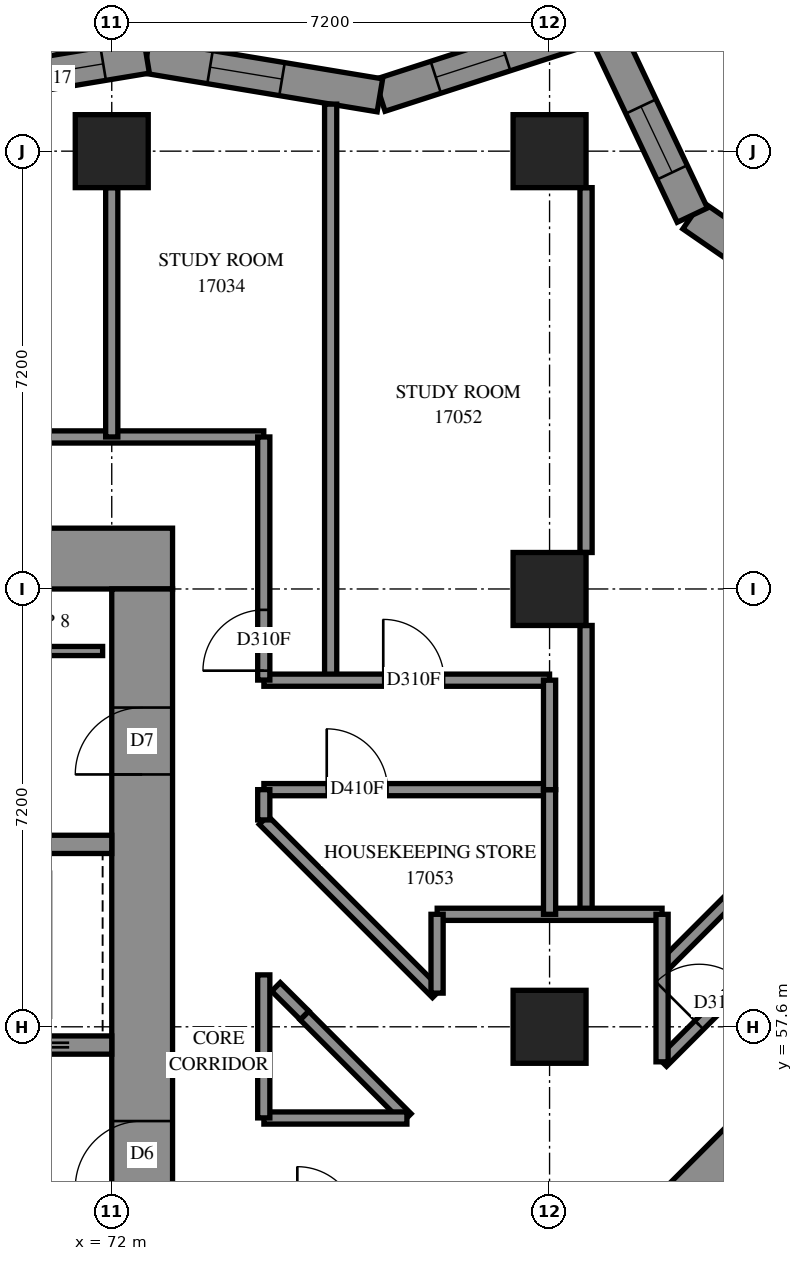
"""IFC4 building model, lengths in metres.
Left out: names, types, materials, properties, quantities, classifications, styles, units other than length and angle.
Written with IfcOpenShell. Run it as: python <this file> out.ifc"""

import sys

from ifc_helpers import new_model, si_unit, direction, frame, frame_2d, origin, origin_2d, place, context, subcontext, project, spatial, polyline, rectangle, outline, extrude, element, fill, save


model = new_model("IFC4")
c1 = context("Model", 3, precision=1e-05, world=origin(), true_north=direction((0.0, 1.0)))
c2 = subcontext(c1, "Body", "Model", "MODEL_VIEW")
j1 = project(units=[si_unit("LENGTHUNIT", "METRE"), si_unit("PLANEANGLEUNIT", "RADIAN")], contexts=[c1])
p1 = place(None, origin())
s1 = spatial("IfcSite", under=j1, at=p1, CompositionType="ELEMENT")
p2 = place(p1, origin())
s2 = spatial("IfcBuilding", under=s1, at=p2, CompositionType="ELEMENT")
p3 = place(p2, frame((0.0, 0.0, 64.4)))
s3 = spatial("IfcBuildingStorey", under=s2, at=p3, CompositionType="ELEMENT", Elevation=64.4)
for number, where, z_axis, x_axis in (
    (1, (72.0, 72.0, 0.0), (0.0, 0.0, 1.0), (1.0, 0.0, 0.0)),
    (2, (79.2, 57.6, 0.0), (0.0, 0.0, 1.0), (1.0, 0.0, 0.0)),
    (3, (79.2, 64.8, 0.0), (0.0, 0.0, 1.0), (1.0, 0.0, 0.0)),
    (4, (79.2, 72.0, 0.0), (0.0, 0.0, 1.0), (1.0, 0.0, 0.0)),
):
    element("IfcColumn", number, at=place(p3, frame(where, z_axis=z_axis, x_axis=x_axis)), inside=s3, PredefinedType="COLUMN", context=c2, shape_type="SweptSolid", body=[
        extrude(rectangle(XDim=1.2, YDim=1.2, at=origin_2d()), origin(), (0.0, 0.0, 1.0), 3.1),
    ])
p4 = place(p3, frame((56.6, 65.3, -0.3), z_axis=(0.0, 0.0, 1.0), x_axis=(1.0, 0.0, 0.0)))
e5 = element("IfcWall", 5, at=p4, inside=s3, PredefinedType="SHEAR", context=c2, shape_type="SweptSolid", body=[
    extrude(rectangle(XDim=16.4, YDim=1.0, at=frame_2d((8.2, 0.0))), origin(), (0.0, 0.0, 1.0), 2.7),
])
p5 = place(p4, frame((11.0, 0.0, 0.3)))
e6 = element("IfcOpeningElement", 6, at=p5, cuts=e5, PredefinedType="OPENING", context=c2, shape_type="SweptSolid", body=[
    extrude(rectangle(XDim=0.8, YDim=2.1, at=frame_2d((0.4, 1.05))), frame((0.0, 0.51, 0.0), z_axis=(0.0, -1.0, 0.0), x_axis=(1.0, 0.0, 0.0)), (0.0, 0.0, 1.0), 1.02),
])
p6 = place(p3, frame((72.5, 50.4, -0.3), z_axis=(0.0, 0.0, 1.0), x_axis=(0.0, 1.0, 0.0)))
e7 = element("IfcWall", 7, at=p6, inside=s3, PredefinedType="SHEAR", context=c2, shape_type="SweptSolid", body=[
    extrude(rectangle(XDim=14.4, YDim=1.0, at=frame_2d((7.2, 0.0))), origin(), (0.0, 0.0, 1.0), 2.7),
])
p7 = place(p6, frame((4.55, 0.0, 0.3)))
e8 = element("IfcOpeningElement", 8, at=p7, cuts=e7, PredefinedType="OPENING", context=c2, shape_type="SweptSolid", body=[
    extrude(rectangle(XDim=1.1, YDim=2.1, at=frame_2d((0.55, 1.05))), frame((0.0, 0.51, 0.0), z_axis=(0.0, -1.0, 0.0), x_axis=(1.0, 0.0, 0.0)), (0.0, 0.0, 1.0), 1.02),
])
p8 = place(p6, frame((11.35, 0.0, 0.3)))
e9 = element("IfcOpeningElement", 9, at=p8, cuts=e7, PredefinedType="OPENING", context=c2, shape_type="SweptSolid", body=[
    extrude(rectangle(XDim=1.1, YDim=2.1, at=frame_2d((0.55, 1.05))), frame((0.0, 0.51, 0.0), z_axis=(0.0, -1.0, 0.0), x_axis=(1.0, 0.0, 0.0)), (0.0, 0.0, 1.0), 1.02),
])
p9 = place(p3, frame((57.6, 57.3, 0.0), z_axis=(0.0, 0.0, 1.0), x_axis=(1.0, 0.0, 0.0)))
e10 = element("IfcWall", 10, at=p9, inside=s3, PredefinedType="SOLIDWALL", context=c2, shape_type="SweptSolid", body=[
    extrude(rectangle(XDim=14.4, YDim=0.3, at=frame_2d((7.2, 0.0))), origin(), (0.0, 0.0, 1.0), 3.1),
])
p10 = place(p9, frame((12.05, 0.0, 0.0)))
e11 = element("IfcOpeningElement", 11, at=p10, cuts=e10, PredefinedType="OPENING", context=c2, shape_type="SweptSolid", body=[
    extrude(rectangle(XDim=1.1, YDim=2.1, at=frame_2d((0.55, 1.05))), frame((0.0, 0.16, 0.0), z_axis=(0.0, -1.0, 0.0), x_axis=(1.0, 0.0, 0.0)), (0.0, 0.0, 1.0), 0.32),
])
p11 = place(p3, frame((64.8, 60.6, 0.0), z_axis=(0.0, 0.0, 1.0), x_axis=(1.0, 0.0, 0.0)))
e12 = element("IfcWall", 12, at=p11, inside=s3, PredefinedType="SOLIDWALL", context=c2, shape_type="SweptSolid", body=[
    extrude(rectangle(XDim=7.2, YDim=0.3, at=frame_2d((3.6, 0.0))), origin(), (0.0, 0.0, 1.0), 3.1),
])
p12 = place(p3, frame((76.301, 49.443, -0.3), z_axis=(0.0, 0.0, 1.0), x_axis=(0.7071067812, 0.7071067812, 0.0)))
e13 = element("IfcWall", 13, at=p12, inside=s3, PredefinedType="SHEAR", context=c2, shape_type="SweptSolid", body=[
    extrude(rectangle(XDim=14.4, YDim=1.0, at=frame_2d((7.2, 0.0))), origin(), (0.0, 0.0, 1.0), 2.7),
])
p13 = place(p12, frame((4.55, 0.0, 0.3)))
e14 = element("IfcOpeningElement", 14, at=p13, cuts=e13, PredefinedType="OPENING", context=c2, shape_type="SweptSolid", body=[
    extrude(rectangle(XDim=1.1, YDim=2.1, at=frame_2d((0.55, 1.05))), frame((0.0, 0.51, 0.0), z_axis=(0.0, -1.0, 0.0), x_axis=(1.0, 0.0, 0.0)), (0.0, 0.0, 1.0), 1.02),
])
p14 = place(p12, frame((11.35, 0.0, 0.3)))
e15 = element("IfcOpeningElement", 15, at=p14, cuts=e13, PredefinedType="OPENING", context=c2, shape_type="SweptSolid", body=[
    extrude(rectangle(XDim=1.1, YDim=2.1, at=frame_2d((0.55, 1.05))), frame((0.0, 0.51, 0.0), z_axis=(0.0, -1.0, 0.0), x_axis=(1.0, 0.0, 0.0)), (0.0, 0.0, 1.0), 1.02),
])
p15 = place(p3, frame((84.444, 68.949, 0.0), z_axis=(0.0, 0.0, 1.0), x_axis=(-0.8229699745, 0.5680848714, 0.0)))
e16 = element("IfcWall", 16, at=p15, inside=s3, PredefinedType="SOLIDWALL", context=c2, shape_type="SweptSolid", body=[
    extrude(outline(polyline([(-0.05, -0.275), (3.445, -0.275), (3.593, 0.275), (0.05, 0.275), (-0.05, -0.275)])), origin(), (0.0, 0.0, 1.0), 3.1),
])
p16 = place(p15, frame((0.677, 0.0, 0.5)))
e17 = element("IfcOpeningElement", 17, at=p16, cuts=e16, PredefinedType="OPENING", context=c2, shape_type="SweptSolid", body=[
    extrude(rectangle(XDim=1.2, YDim=2.45, at=frame_2d((0.6, 1.225))), frame((0.0, 0.285, 0.0), z_axis=(0.0, -1.0, 0.0), x_axis=(1.0, 0.0, 0.0)), (0.0, 0.0, 1.0), 0.57),
])
p17 = place(p3, frame((81.548, 70.948, 0.0), z_axis=(0.0, 0.0, 1.0), x_axis=(-0.427600137, 0.9039679877, 0.0)))
e18 = element("IfcWall", 18, at=p17, inside=s3, PredefinedType="SOLIDWALL", context=c2, shape_type="SweptSolid", body=[
    extrude(outline(polyline([(0.074, -0.275), (3.725, -0.275), (3.242, 0.275), (-0.074, 0.275), (0.074, -0.275)])), origin(), (0.0, 0.0, 1.0), 3.1),
])
p18 = place(p17, frame((0.777, 0.0, 0.5)))
e19 = element("IfcOpeningElement", 19, at=p18, cuts=e18, PredefinedType="OPENING", context=c2, shape_type="SweptSolid", body=[
    extrude(rectangle(XDim=1.2, YDim=2.45, at=frame_2d((0.6, 1.225))), frame((0.0, 0.285, 0.0), z_axis=(0.0, -1.0, 0.0), x_axis=(1.0, 0.0, 0.0)), (0.0, 0.0, 1.0), 0.57),
])
p19 = place(p3, frame((80.058, 74.097, 0.0), z_axis=(0.0, 0.0, 1.0), x_axis=(-0.951538377, -0.3075300264, 0.0)))
e20 = element("IfcWall", 20, at=p19, inside=s3, PredefinedType="SOLIDWALL", context=c2, shape_type="SweptSolid", body=[
    extrude(outline(polyline([(-0.242, -0.275), (3.768, -0.275), (3.901, 0.275), (0.242, 0.275), (-0.242, -0.275)])), origin(), (0.0, 0.0, 1.0), 3.1),
])
p20 = place(p19, frame((1.668, 0.0, 0.5)))
e21 = element("IfcOpeningElement", 21, at=p20, cuts=e20, PredefinedType="OPENING", context=c2, shape_type="SweptSolid", body=[
    extrude(rectangle(XDim=1.2, YDim=2.45, at=frame_2d((0.6, 1.225))), frame((0.0, 0.285, 0.0), z_axis=(0.0, -1.0, 0.0), x_axis=(1.0, 0.0, 0.0)), (0.0, 0.0, 1.0), 0.57),
])
p21 = place(p3, frame((76.41, 72.918, 0.0), z_axis=(0.0, 0.0, 1.0), x_axis=(-0.9865139149, 0.1636774136, 0.0)))
e22 = element("IfcWall", 22, at=p21, inside=s3, PredefinedType="SOLIDWALL", context=c2, shape_type="SweptSolid", body=[
    extrude(outline(polyline([(0.067, -0.275), (3.934, -0.275), (3.843, 0.275), (-0.067, 0.275), (0.067, -0.275)])), origin(), (0.0, 0.0, 1.0), 3.1),
])
p22 = place(p21, frame((1.632, 0.0, 0.5)))
e23 = element("IfcOpeningElement", 23, at=p22, cuts=e22, PredefinedType="OPENING", context=c2, shape_type="SweptSolid", body=[
    extrude(rectangle(XDim=1.2, YDim=2.45, at=frame_2d((0.6, 1.225))), frame((0.0, 0.285, 0.0), z_axis=(0.0, -1.0, 0.0), x_axis=(1.0, 0.0, 0.0)), (0.0, 0.0, 1.0), 0.57),
])
p23 = place(p3, frame((72.574, 73.554, 0.0), z_axis=(0.0, 0.0, 1.0), x_axis=(-0.9865110911, -0.1636944324, 0.0)))
e24 = element("IfcWall", 24, at=p23, inside=s3, PredefinedType="SOLIDWALL", context=c2, shape_type="SweptSolid", body=[
    extrude(outline(polyline([(-0.046, -0.275), (3.821, -0.275), (3.913, 0.275), (0.046, 0.275), (-0.046, -0.275)])), origin(), (0.0, 0.0, 1.0), 3.1),
])
p24 = place(p23, frame((0.724, 0.0, 0.5)))
e25 = element("IfcOpeningElement", 25, at=p24, cuts=e24, PredefinedType="OPENING", context=c2, shape_type="SweptSolid", body=[
    extrude(rectangle(XDim=2.8, YDim=2.45, at=frame_2d((1.4, 1.225))), frame((0.0, 0.285, 0.0), z_axis=(0.0, -1.0, 0.0), x_axis=(1.0, 0.0, 0.0)), (0.0, 0.0, 1.0), 0.57),
])
p25 = place(p3, frame((64.95, 63.78, 0.0), z_axis=(0.0, 0.0, 1.0), x_axis=(1.0, 0.0, 0.0)))
e26 = element("IfcWall", 26, at=p25, inside=s3, PredefinedType="PARTITIONING", context=c2, shape_type="SweptSolid", body=[
    extrude(rectangle(XDim=6.9, YDim=0.15, at=frame_2d((3.45, 0.0))), origin(), (0.0, 0.0, 1.0), 3.1),
])
p26 = place(p3, frame((55.1, 67.3, 0.0), z_axis=(0.0, 0.0, 1.0), x_axis=(1.0, 0.0, 0.0)))
e27 = element("IfcWall", 27, at=p26, inside=s3, PredefinedType="PARTITIONING", context=c2, shape_type="SweptSolid", body=[
    extrude(rectangle(XDim=19.4, YDim=0.2, at=frame_2d((9.7, 0.0))), origin(), (0.0, 0.0, 1.0), 3.1),
])
p27 = place(p26, frame((6.361, 0.0, 0.0)))
e28 = element("IfcOpeningElement", 28, at=p27, cuts=e27, PredefinedType="OPENING", context=c2, shape_type="SweptSolid", body=[
    extrude(rectangle(XDim=0.9, YDim=2.1, at=frame_2d((0.45, 1.05))), frame((0.0, 0.11, 0.0), z_axis=(0.0, -1.0, 0.0), x_axis=(1.0, 0.0, 0.0)), (0.0, 0.0, 1.0), 0.22),
])
p28 = place(p26, frame((13.561, 0.0, 0.0)))
e29 = element("IfcOpeningElement", 29, at=p28, cuts=e27, PredefinedType="OPENING", context=c2, shape_type="SweptSolid", body=[
    extrude(rectangle(XDim=0.9, YDim=2.1, at=frame_2d((0.45, 1.05))), frame((0.0, 0.11, 0.0), z_axis=(0.0, -1.0, 0.0), x_axis=(1.0, 0.0, 0.0)), (0.0, 0.0, 1.0), 0.22),
])
p29 = place(p3, frame((75.6, 63.3, 0.0), z_axis=(0.0, 0.0, 1.0), x_axis=(0.0, 1.0, 0.0)))
e30 = element("IfcWall", 30, at=p29, inside=s3, PredefinedType="PARTITIONING", context=c2, shape_type="SweptSolid", body=[
    extrude(rectangle(XDim=9.473, YDim=0.2, at=frame_2d((4.737, 0.0))), origin(), (0.0, 0.0, 1.0), 3.1),
])
p30 = place(p3, frame((81.049, 58.577, 0.0), z_axis=(0.0, 0.0, 1.0), x_axis=(0.7071067812, 0.7071067812, 0.0)))
e31 = element("IfcWall", 31, at=p30, inside=s3, PredefinedType="PARTITIONING", context=c2, shape_type="SweptSolid", body=[
    extrude(rectangle(XDim=9.099, YDim=0.2, at=frame_2d((4.55, 0.0))), origin(), (0.0, 0.0, 1.0), 3.1),
])
p31 = place(p3, frame((81.053, 57.021, 0.0), z_axis=(0.0, 0.0, 1.0), x_axis=(0.7069845395, 0.7072290017, 0.0)))
e32 = element("IfcWall", 32, at=p31, inside=s3, PredefinedType="PARTITIONING", context=c2, shape_type="SweptSolid", body=[
    extrude(rectangle(XDim=8.181, YDim=0.2, at=frame_2d((4.091, 0.0))), origin(), (0.0, 0.0, 1.0), 3.1),
])
p32 = place(p31, frame((0.86, 0.0, 0.0)))
e33 = element("IfcOpeningElement", 33, at=p32, cuts=e32, PredefinedType="OPENING", context=c2, shape_type="SweptSolid", body=[
    extrude(rectangle(XDim=1.0, YDim=2.1, at=frame_2d((0.5, 1.05))), frame((0.0, 0.11, 0.0), z_axis=(0.0, -1.0, 0.0), x_axis=(1.0, 0.0, 0.0)), (0.0, 0.0, 1.0), 0.22),
])
p33 = place(p3, frame((79.8, 65.4, 0.0), z_axis=(0.0, 0.0, 1.0), x_axis=(0.0, 1.0, 0.0)))
e34 = element("IfcWall", 34, at=p33, inside=s3, PredefinedType="PARTITIONING", context=c2, shape_type="SweptSolid", body=[
    extrude(rectangle(XDim=6.0, YDim=0.2, at=frame_2d((3.0, 0.0))), origin(), (0.0, 0.0, 1.0), 3.1),
])
p34 = place(p3, frame((79.8, 59.45, 0.0), z_axis=(0.0, 0.0, 1.0), x_axis=(0.0, 1.0, 0.0)))
e35 = element("IfcWall", 35, at=p34, inside=s3, PredefinedType="PARTITIONING", context=c2, shape_type="SweptSolid", body=[
    extrude(rectangle(XDim=4.75, YDim=0.2, at=frame_2d((2.375, 0.0))), origin(), (0.0, 0.0, 1.0), 3.1),
])
p35 = place(p3, frame((74.502, 63.3, 0.0), z_axis=(0.0, 0.0, 1.0), x_axis=(1.0, 0.0, 0.0)))
e36 = element("IfcWall", 36, at=p35, inside=s3, PredefinedType="PARTITIONING", context=c2, shape_type="SweptSolid", body=[
    extrude(rectangle(XDim=4.698, YDim=0.2, at=frame_2d((2.349, 0.0))), origin(), (0.0, 0.0, 1.0), 3.1),
])
p36 = place(p35, frame((1.963, 0.0, 0.0)))
e37 = element("IfcOpeningElement", 37, at=p36, cuts=e36, PredefinedType="OPENING", context=c2, shape_type="SweptSolid", body=[
    extrude(rectangle(XDim=1.0, YDim=2.1, at=frame_2d((0.5, 1.05))), frame((0.0, 0.11, 0.0), z_axis=(0.0, -1.0, 0.0), x_axis=(1.0, 0.0, 0.0)), (0.0, 0.0, 1.0), 0.22),
])
p37 = place(p3, frame((74.502, 61.5, 0.0), z_axis=(0.0, 0.0, 1.0), x_axis=(1.0, 0.0, 0.0)))
e38 = element("IfcWall", 38, at=p37, inside=s3, PredefinedType="PARTITIONING", context=c2, shape_type="SweptSolid", body=[
    extrude(rectangle(XDim=4.698, YDim=0.2, at=frame_2d((2.349, 0.0))), origin(), (0.0, 0.0, 1.0), 3.1),
])
p38 = place(p37, frame((1.034, 0.0, 0.0)))
e39 = element("IfcOpeningElement", 39, at=p38, cuts=e38, PredefinedType="OPENING", context=c2, shape_type="SweptSolid", body=[
    extrude(rectangle(XDim=1.0, YDim=2.1, at=frame_2d((0.5, 1.05))), frame((0.0, 0.11, 0.0), z_axis=(0.0, -1.0, 0.0), x_axis=(1.0, 0.0, 0.0)), (0.0, 0.0, 1.0), 0.22),
])
p39 = place(p3, frame((72.0, 67.3, 0.0), z_axis=(0.0, 0.0, 1.0), x_axis=(0.0, 1.0, 0.0)))
e40 = element("IfcWall", 40, at=p39, inside=s3, PredefinedType="PARTITIONING", context=c2, shape_type="SweptSolid", body=[
    extrude(rectangle(XDim=4.1, YDim=0.2, at=frame_2d((2.05, 0.0))), origin(), (0.0, 0.0, 1.0), 3.1),
])
p40 = place(p3, frame((74.497, 60.999, 0.0), z_axis=(0.0, 0.0, 1.0), x_axis=(0.7071067812, -0.7071067812, 0.0)))
e41 = element("IfcWall", 41, at=p40, inside=s3, PredefinedType="PARTITIONING", context=c2, shape_type="SweptSolid", body=[
    extrude(rectangle(XDim=4.028, YDim=0.2, at=frame_2d((2.014, 0.0))), origin(), (0.0, 0.0, 1.0), 3.1),
])
p41 = place(p3, frame((74.5, 63.302, 0.0), z_axis=(0.0, 0.0, 1.0), x_axis=(0.0, 1.0, 0.0)))
e42 = element("IfcWall", 42, at=p41, inside=s3, PredefinedType="PARTITIONING", context=c2, shape_type="SweptSolid", body=[
    extrude(rectangle(XDim=3.998, YDim=0.2, at=frame_2d((1.999, 0.0))), origin(), (0.0, 0.0, 1.0), 3.1),
])
p42 = place(p41, frame((0.154, 0.0, 0.0)))
e43 = element("IfcOpeningElement", 43, at=p42, cuts=e42, PredefinedType="OPENING", context=c2, shape_type="SweptSolid", body=[
    extrude(rectangle(XDim=1.0, YDim=2.1, at=frame_2d((0.5, 1.05))), frame((0.0, 0.11, 0.0), z_axis=(0.0, -1.0, 0.0), x_axis=(1.0, 0.0, 0.0)), (0.0, 0.0, 1.0), 0.22),
])
p43 = place(p3, frame((77.352, 59.45, 0.0), z_axis=(0.0, 0.0, 1.0), x_axis=(1.0, 0.0, 0.0)))
e44 = element("IfcWall", 44, at=p43, inside=s3, PredefinedType="PARTITIONING", context=c2, shape_type="SweptSolid", body=[
    extrude(rectangle(XDim=3.698, YDim=0.2, at=frame_2d((1.849, 0.0))), origin(), (0.0, 0.0, 1.0), 3.1),
])
p44 = place(p3, frame((81.05, 57.024, 0.0), z_axis=(0.0, 0.0, 1.0), x_axis=(0.0, 1.0, 0.0)))
e45 = element("IfcWall", 45, at=p44, inside=s3, PredefinedType="PARTITIONING", context=c2, shape_type="SweptSolid", body=[
    extrude(rectangle(XDim=2.426, YDim=0.2, at=frame_2d((1.213, 0.0))), origin(), (0.0, 0.0, 1.0), 3.1),
])
p45 = place(p3, frame((75.168, 57.786, 0.0), z_axis=(0.0, 0.0, 1.0), x_axis=(0.7066870088, -0.7075263045, 0.0)))
e46 = element("IfcWall", 46, at=p45, inside=s3, PredefinedType="PARTITIONING", context=c2, shape_type="SweptSolid", body=[
    extrude(rectangle(XDim=2.383, YDim=0.2, at=frame_2d((1.192, 0.0))), origin(), (0.0, 0.0, 1.0), 3.1),
])
for number, where, z_axis, x_axis in (
    (47, (74.502, 56.1, 0.0), (0.0, 0.0, 1.0), (1.0, 0.0, 0.0)),
    (48, (74.5, 56.102, 0.0), (0.0, 0.0, 1.0), (0.0, 1.0, 0.0)),
):
    element("IfcWall", number, at=place(p3, frame(where, z_axis=z_axis, x_axis=x_axis)), inside=s3, PredefinedType="PARTITIONING", context=c2, shape_type="SweptSolid", body=[
        extrude(rectangle(XDim=2.352, YDim=0.2, at=frame_2d((1.176, 0.0))), origin(), (0.0, 0.0, 1.0), 3.1),
    ])
p46 = place(p3, frame((79.2, 59.45, 0.0), z_axis=(0.0, 0.0, 1.0), x_axis=(0.0, 1.0, 0.0)))
e49 = element("IfcWall", 49, at=p46, inside=s3, PredefinedType="PARTITIONING", context=c2, shape_type="SweptSolid", body=[
    extrude(rectangle(XDim=2.05, YDim=0.2, at=frame_2d((1.025, 0.0))), origin(), (0.0, 0.0, 1.0), 3.1),
])
p47 = place(p3, frame((79.2, 61.5, 0.0), z_axis=(0.0, 0.0, 1.0), x_axis=(0.0, 1.0, 0.0)))
e50 = element("IfcWall", 50, at=p47, inside=s3, PredefinedType="PARTITIONING", context=c2, shape_type="SweptSolid", body=[
    extrude(rectangle(XDim=1.8, YDim=0.2, at=frame_2d((0.9, 0.0))), origin(), (0.0, 0.0, 1.0), 3.1),
])
p48 = place(p3, frame((77.35, 58.154, 0.0), z_axis=(0.0, 0.0, 1.0), x_axis=(0.0, 1.0, 0.0)))
e51 = element("IfcWall", 51, at=p48, inside=s3, PredefinedType="PARTITIONING", context=c2, shape_type="SweptSolid", body=[
    extrude(rectangle(XDim=1.296, YDim=0.2, at=frame_2d((0.648, 0.0))), origin(), (0.0, 0.0, 1.0), 3.1),
])
p49 = place(p3, frame((74.701, 58.257, 0.0), z_axis=(0.0, 0.0, 1.0), x_axis=(0.7086128608, -0.7055974869, 0.0)))
e52 = element("IfcWall", 52, at=p49, inside=s3, PredefinedType="PARTITIONING", context=c2, shape_type="SweptSolid", body=[
    extrude(rectangle(XDim=0.663, YDim=0.2, at=frame_2d((0.332, 0.0))), origin(), (0.0, 0.0, 1.0), 3.1),
])
p50 = place(p3, frame((74.5, 61.002, 0.0), z_axis=(0.0, 0.0, 1.0), x_axis=(0.0, 1.0, 0.0)))
e53 = element("IfcWall", 53, at=p50, inside=s3, PredefinedType="PARTITIONING", context=c2, shape_type="SweptSolid", body=[
    extrude(rectangle(XDim=0.498, YDim=0.2, at=frame_2d((0.249, 0.0))), origin(), (0.0, 0.0, 1.0), 3.1),
])
p51 = place(p18, origin())
e54 = element("IfcWindow", 54, at=p51, inside=s3, PartitioningType="SINGLE_PANEL", PredefinedType="WINDOW", context=c2, shape_type="SweptSolid", body=[
    extrude(rectangle(XDim=1.2, YDim=2.45, at=frame_2d((0.6, 1.225))), frame((0.0, 0.155, 0.0), z_axis=(0.0, -1.0, 0.0), x_axis=(1.0, 0.0, 0.0)), (0.0, 0.0, 1.0), 0.06),
])
fill(e19, e54)
p52 = place(p20, origin())
e55 = element("IfcWindow", 55, at=p52, inside=s3, PartitioningType="SINGLE_PANEL", PredefinedType="WINDOW", context=c2, shape_type="SweptSolid", body=[
    extrude(rectangle(XDim=1.2, YDim=2.45, at=frame_2d((0.6, 1.225))), frame((0.0, 0.155, 0.0), z_axis=(0.0, -1.0, 0.0), x_axis=(1.0, 0.0, 0.0)), (0.0, 0.0, 1.0), 0.06),
])
fill(e21, e55)
p53 = place(p22, origin())
e56 = element("IfcWindow", 56, at=p53, inside=s3, PartitioningType="SINGLE_PANEL", PredefinedType="WINDOW", context=c2, shape_type="SweptSolid", body=[
    extrude(rectangle(XDim=1.2, YDim=2.45, at=frame_2d((0.6, 1.225))), frame((0.0, 0.155, 0.0), z_axis=(0.0, -1.0, 0.0), x_axis=(1.0, 0.0, 0.0)), (0.0, 0.0, 1.0), 0.06),
])
fill(e23, e56)
p54 = place(p24, origin())
e57 = element("IfcWindow", 57, at=p54, inside=s3, PartitioningType="SINGLE_PANEL", PredefinedType="WINDOW", context=c2, shape_type="SweptSolid", body=[
    extrude(rectangle(XDim=2.8, YDim=2.45, at=frame_2d((1.4, 1.225))), frame((0.0, 0.155, 0.0), z_axis=(0.0, -1.0, 0.0), x_axis=(1.0, 0.0, 0.0)), (0.0, 0.0, 1.0), 0.06),
])
fill(e25, e57)
p55 = place(p7, origin())
e58 = element("IfcDoor", 58, at=p55, inside=s3, OperationType="DOUBLE_DOOR_SINGLE_SWING", PredefinedType="DOOR", context=c2, shape_type="SweptSolid", body=[
    extrude(rectangle(XDim=1.1, YDim=2.1, at=frame_2d((0.55, 1.05))), frame((0.0, 0.025, 0.0), z_axis=(0.0, -1.0, 0.0), x_axis=(1.0, 0.0, 0.0)), (0.0, 0.0, 1.0), 0.05),
])
fill(e8, e58)
p56 = place(p8, origin())
e59 = element("IfcDoor", 59, at=p56, inside=s3, OperationType="SINGLE_SWING_RIGHT", PredefinedType="DOOR", context=c2, shape_type="SweptSolid", body=[
    extrude(rectangle(XDim=1.1, YDim=2.1, at=frame_2d((0.55, 1.05))), frame((0.0, 0.025, 0.0), z_axis=(0.0, -1.0, 0.0), x_axis=(1.0, 0.0, 0.0)), (0.0, 0.0, 1.0), 0.05),
])
fill(e9, e59)
p57 = place(p42, origin())
e60 = element("IfcDoor", 60, at=p57, inside=s3, OperationType="SINGLE_SWING_RIGHT", PredefinedType="DOOR", context=c2, shape_type="SweptSolid", body=[
    extrude(rectangle(XDim=1.0, YDim=2.1, at=frame_2d((0.5, 1.05))), frame((0.0, 0.025, 0.0), z_axis=(0.0, -1.0, 0.0), x_axis=(1.0, 0.0, 0.0)), (0.0, 0.0, 1.0), 0.05),
])
fill(e43, e60)
p58 = place(p36, origin())
e61 = element("IfcDoor", 61, at=p58, inside=s3, OperationType="SINGLE_SWING_LEFT", PredefinedType="DOOR", context=c2, shape_type="SweptSolid", body=[
    extrude(rectangle(XDim=1.0, YDim=2.1, at=frame_2d((0.5, 1.05))), frame((0.0, 0.025, 0.0), z_axis=(0.0, -1.0, 0.0), x_axis=(1.0, 0.0, 0.0)), (0.0, 0.0, 1.0), 0.05),
])
fill(e37, e61)
p59 = place(p38, origin())
e62 = element("IfcDoor", 62, at=p59, inside=s3, OperationType="SINGLE_SWING_RIGHT", PredefinedType="DOOR", context=c2, shape_type="SweptSolid", body=[
    extrude(rectangle(XDim=1.0, YDim=2.1, at=frame_2d((0.5, 1.05))), frame((0.0, 0.025, 0.0), z_axis=(0.0, -1.0, 0.0), x_axis=(1.0, 0.0, 0.0)), (0.0, 0.0, 1.0), 0.05),
])
fill(e39, e62)
p60 = place(p32, origin())
e63 = element("IfcDoor", 63, at=p60, inside=s3, OperationType="SINGLE_SWING_RIGHT", PredefinedType="DOOR", context=c2, shape_type="SweptSolid", body=[
    extrude(rectangle(XDim=1.0, YDim=2.1, at=frame_2d((0.5, 1.05))), frame((0.0, 0.025, 0.0), z_axis=(0.0, -1.0, 0.0), x_axis=(1.0, 0.0, 0.0)), (0.0, 0.0, 1.0), 0.05),
])
fill(e33, e63)
save(model, sys.argv[1])
